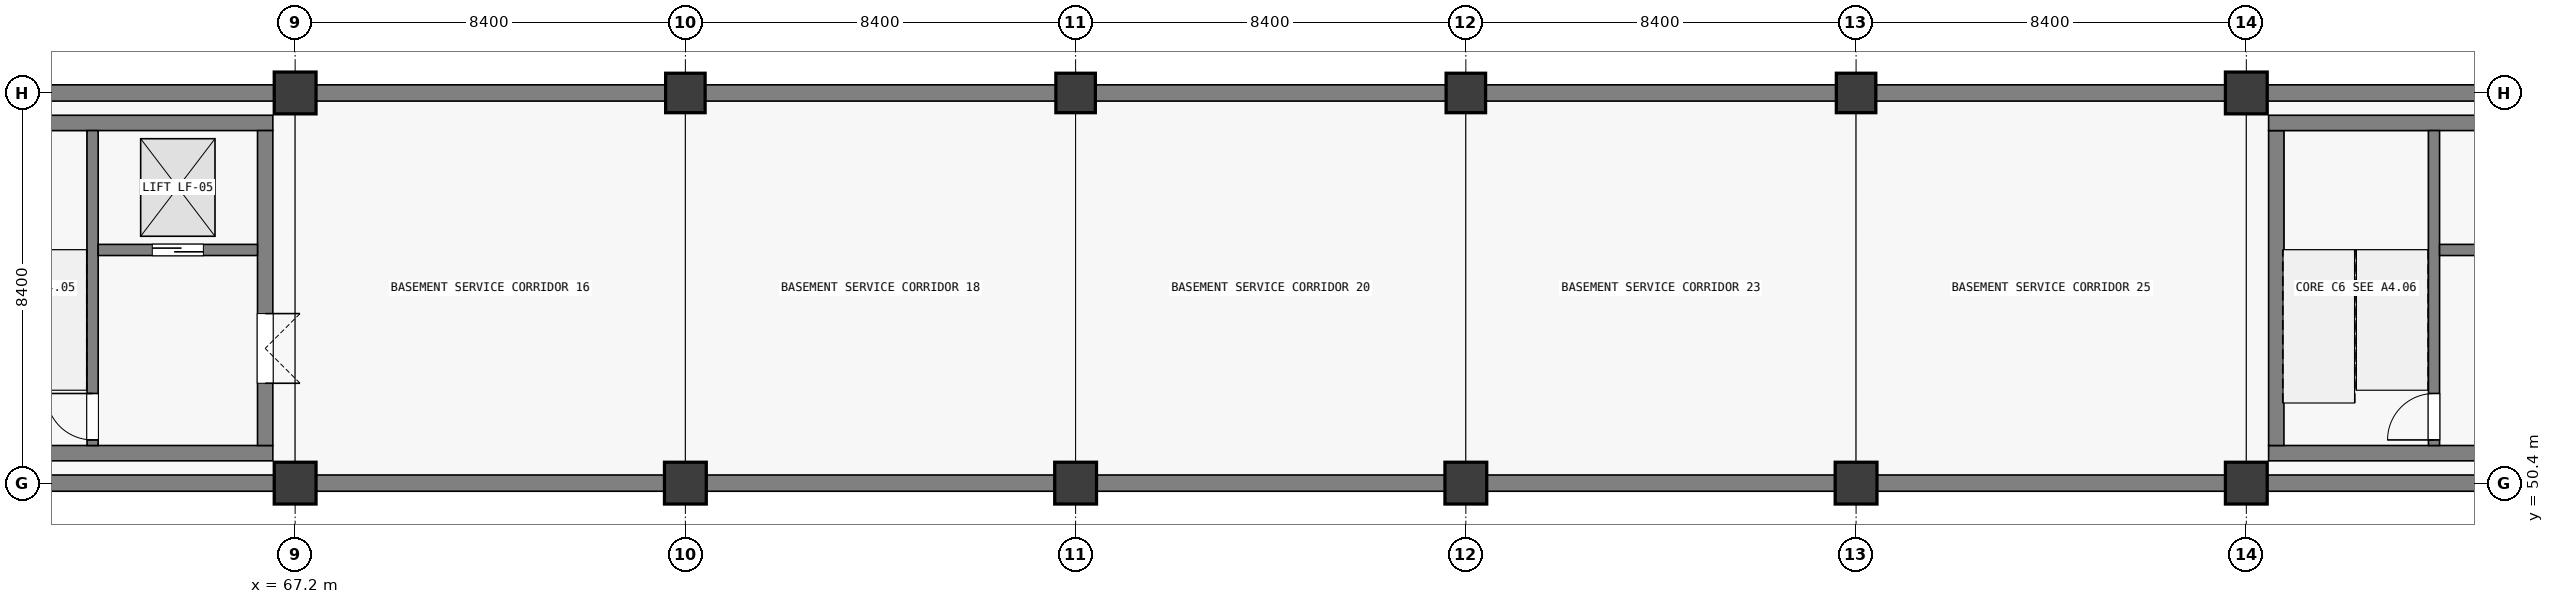
"""IFC4 building model, lengths in metres.
Left out: names, types, materials, properties, quantities, classifications, styles, units other than length and angle.
Written with IfcOpenShell. Run it as: python <this file> out.ifc"""

import sys

from ifc_helpers import new_model, si_unit, direction, frame, frame_2d, origin, origin_2d, place, context, subcontext, project, spatial, rectangle, extrude, element, fill, save


model = new_model("IFC4")
c1 = context("Model", 3, precision=1e-05, world=origin(), true_north=direction((0.0, 1.0)))
c2 = subcontext(c1, "Body", "Model", "MODEL_VIEW")
j1 = project(units=[si_unit("LENGTHUNIT", "METRE"), si_unit("PLANEANGLEUNIT", "RADIAN")], contexts=[c1])
p1 = place(None, origin())
s1 = spatial("IfcSite", under=j1, at=p1, CompositionType="ELEMENT")
p2 = place(p1, origin())
s2 = spatial("IfcBuilding", under=s1, at=p2, CompositionType="ELEMENT")
p3 = place(p2, frame((0.0, 0.0, -4.5)))
s3 = spatial("IfcBuildingStorey", under=s2, at=p3, CompositionType="ELEMENT", Elevation=-4.5)
for number, where, z_axis, x_axis in (
    (1, (67.2, 50.4, -0.35), (0.0, 0.0, 1.0), (1.0, 0.0, 0.0)),
    (2, (67.2, 58.8, -0.35), (0.0, 0.0, 1.0), (1.0, 0.0, 0.0)),
    (3, (75.6, 50.4, -0.35), (0.0, 0.0, 1.0), (1.0, 0.0, 0.0)),
):
    element("IfcColumn", number, at=place(p3, frame(where, z_axis=z_axis, x_axis=x_axis)), inside=s3, PredefinedType="COLUMN", context=c2, shape_type="SweptSolid", body=[
        extrude(rectangle(XDim=0.9, YDim=0.9, at=origin_2d()), origin(), (0.0, 0.0, 1.0), 4.85),
    ])
p4 = place(p3, frame((75.6, 58.8, -0.35), z_axis=(0.0, 0.0, 1.0), x_axis=(1.0, 0.0, 0.0)))
e4 = element("IfcColumn", 4, at=p4, inside=s3, PredefinedType="COLUMN", context=c2, shape_type="SweptSolid", body=[
    extrude(rectangle(XDim=0.85, YDim=0.85, at=origin_2d()), origin(), (0.0, 0.0, 1.0), 4.5),
])
p5 = place(p3, frame((84.0, 50.4, -0.35), z_axis=(0.0, 0.0, 1.0), x_axis=(1.0, 0.0, 0.0)))
e5 = element("IfcColumn", 5, at=p5, inside=s3, PredefinedType="COLUMN", context=c2, shape_type="SweptSolid", body=[
    extrude(rectangle(XDim=0.9, YDim=0.9, at=origin_2d()), origin(), (0.0, 0.0, 1.0), 4.85),
])
p6 = place(p3, frame((84.0, 58.8, -0.35), z_axis=(0.0, 0.0, 1.0), x_axis=(1.0, 0.0, 0.0)))
e6 = element("IfcColumn", 6, at=p6, inside=s3, PredefinedType="COLUMN", context=c2, shape_type="SweptSolid", body=[
    extrude(rectangle(XDim=0.85, YDim=0.85, at=origin_2d()), origin(), (0.0, 0.0, 1.0), 4.5),
])
p7 = place(p3, frame((92.4, 50.4, -0.35), z_axis=(0.0, 0.0, 1.0), x_axis=(1.0, 0.0, 0.0)))
e7 = element("IfcColumn", 7, at=p7, inside=s3, PredefinedType="COLUMN", context=c2, shape_type="SweptSolid", body=[
    extrude(rectangle(XDim=0.9, YDim=0.9, at=origin_2d()), origin(), (0.0, 0.0, 1.0), 4.85),
])
p8 = place(p3, frame((92.4, 58.8, -0.35), z_axis=(0.0, 0.0, 1.0), x_axis=(1.0, 0.0, 0.0)))
e8 = element("IfcColumn", 8, at=p8, inside=s3, PredefinedType="COLUMN", context=c2, shape_type="SweptSolid", body=[
    extrude(rectangle(XDim=0.85, YDim=0.85, at=origin_2d()), origin(), (0.0, 0.0, 1.0), 4.5),
])
p9 = place(p3, frame((100.8, 50.4, -0.35), z_axis=(0.0, 0.0, 1.0), x_axis=(1.0, 0.0, 0.0)))
e9 = element("IfcColumn", 9, at=p9, inside=s3, PredefinedType="COLUMN", context=c2, shape_type="SweptSolid", body=[
    extrude(rectangle(XDim=0.9, YDim=0.9, at=origin_2d()), origin(), (0.0, 0.0, 1.0), 4.85),
])
p10 = place(p3, frame((100.8, 58.8, -0.35), z_axis=(0.0, 0.0, 1.0), x_axis=(1.0, 0.0, 0.0)))
e10 = element("IfcColumn", 10, at=p10, inside=s3, PredefinedType="COLUMN", context=c2, shape_type="SweptSolid", body=[
    extrude(rectangle(XDim=0.85, YDim=0.85, at=origin_2d()), origin(), (0.0, 0.0, 1.0), 4.5),
])
for number, where, z_axis, x_axis in (
    (11, (109.2, 50.4, -0.35), (0.0, 0.0, 1.0), (1.0, 0.0, 0.0)),
    (12, (109.2, 58.8, -0.35), (0.0, 0.0, 1.0), (1.0, 0.0, 0.0)),
):
    element("IfcColumn", number, at=place(p3, frame(where, z_axis=z_axis, x_axis=x_axis)), inside=s3, PredefinedType="COLUMN", context=c2, shape_type="SweptSolid", body=[
        extrude(rectangle(XDim=0.9, YDim=0.9, at=origin_2d()), origin(), (0.0, 0.0, 1.0), 4.85),
    ])
for number, where, z_axis, x_axis in (
    (13, (66.749, 50.4, 0.0), (0.0, 0.0, 1.0), (-1.0, 0.0, 0.0)),
    (14, (59.251, 58.8, 0.0), (0.0, 0.0, 1.0), (1.0, 0.0, 0.0)),
    (15, (75.149, 50.4, 0.0), (0.0, 0.0, 1.0), (-1.0, 0.0, 0.0)),
):
    element("IfcWall", number, at=place(p3, frame(where, z_axis=z_axis, x_axis=x_axis)), inside=s3, PredefinedType="SOLIDWALL", context=c2, shape_type="SweptSolid", body=[
        extrude(rectangle(XDim=7.498, YDim=0.35, at=frame_2d((3.749, 0.0))), origin(), (0.0, 0.0, 1.0), 3.35),
    ])
p11 = place(p3, frame((67.651, 58.8, 0.0), z_axis=(0.0, 0.0, 1.0), x_axis=(1.0, 0.0, 0.0)))
e16 = element("IfcWall", 16, at=p11, inside=s3, PredefinedType="SOLIDWALL", context=c2, shape_type="SweptSolid", body=[
    extrude(rectangle(XDim=7.523, YDim=0.35, at=frame_2d((3.762, 0.0))), origin(), (0.0, 0.0, 1.0), 3.35),
])
p12 = place(p3, frame((83.549, 50.4, 0.0), z_axis=(0.0, 0.0, 1.0), x_axis=(-1.0, 0.0, 0.0)))
e17 = element("IfcWall", 17, at=p12, inside=s3, PredefinedType="SOLIDWALL", context=c2, shape_type="SweptSolid", body=[
    extrude(rectangle(XDim=7.498, YDim=0.35, at=frame_2d((3.749, 0.0))), origin(), (0.0, 0.0, 1.0), 3.35),
])
p13 = place(p3, frame((76.026, 58.8, 0.0), z_axis=(0.0, 0.0, 1.0), x_axis=(1.0, 0.0, 0.0)))
e18 = element("IfcWall", 18, at=p13, inside=s3, PredefinedType="SOLIDWALL", context=c2, shape_type="SweptSolid", body=[
    extrude(rectangle(XDim=7.548, YDim=0.35, at=frame_2d((3.774, 0.0))), origin(), (0.0, 0.0, 1.0), 3.35),
])
p14 = place(p3, frame((91.949, 50.4, 0.0), z_axis=(0.0, 0.0, 1.0), x_axis=(-1.0, 0.0, 0.0)))
e19 = element("IfcWall", 19, at=p14, inside=s3, PredefinedType="SOLIDWALL", context=c2, shape_type="SweptSolid", body=[
    extrude(rectangle(XDim=7.498, YDim=0.35, at=frame_2d((3.749, 0.0))), origin(), (0.0, 0.0, 1.0), 3.35),
])
p15 = place(p3, frame((84.426, 58.8, 0.0), z_axis=(0.0, 0.0, 1.0), x_axis=(1.0, 0.0, 0.0)))
e20 = element("IfcWall", 20, at=p15, inside=s3, PredefinedType="SOLIDWALL", context=c2, shape_type="SweptSolid", body=[
    extrude(rectangle(XDim=7.548, YDim=0.35, at=frame_2d((3.774, 0.0))), origin(), (0.0, 0.0, 1.0), 3.35),
])
p16 = place(p3, frame((100.349, 50.4, 0.0), z_axis=(0.0, 0.0, 1.0), x_axis=(-1.0, 0.0, 0.0)))
e21 = element("IfcWall", 21, at=p16, inside=s3, PredefinedType="SOLIDWALL", context=c2, shape_type="SweptSolid", body=[
    extrude(rectangle(XDim=7.498, YDim=0.35, at=frame_2d((3.749, 0.0))), origin(), (0.0, 0.0, 1.0), 3.35),
])
p17 = place(p3, frame((92.826, 58.8, 0.0), z_axis=(0.0, 0.0, 1.0), x_axis=(1.0, 0.0, 0.0)))
e22 = element("IfcWall", 22, at=p17, inside=s3, PredefinedType="SOLIDWALL", context=c2, shape_type="SweptSolid", body=[
    extrude(rectangle(XDim=7.548, YDim=0.35, at=frame_2d((3.774, 0.0))), origin(), (0.0, 0.0, 1.0), 3.35),
])
p18 = place(p3, frame((108.749, 50.4, 0.0), z_axis=(0.0, 0.0, 1.0), x_axis=(-1.0, 0.0, 0.0)))
e23 = element("IfcWall", 23, at=p18, inside=s3, PredefinedType="SOLIDWALL", context=c2, shape_type="SweptSolid", body=[
    extrude(rectangle(XDim=7.498, YDim=0.35, at=frame_2d((3.749, 0.0))), origin(), (0.0, 0.0, 1.0), 3.35),
])
p19 = place(p3, frame((101.226, 58.8, 0.0), z_axis=(0.0, 0.0, 1.0), x_axis=(1.0, 0.0, 0.0)))
e24 = element("IfcWall", 24, at=p19, inside=s3, PredefinedType="SOLIDWALL", context=c2, shape_type="SweptSolid", body=[
    extrude(rectangle(XDim=7.523, YDim=0.35, at=frame_2d((3.761, 0.0))), origin(), (0.0, 0.0, 1.0), 3.35),
])
for number, where, z_axis, x_axis in (
    (25, (117.149, 50.4, 0.0), (0.0, 0.0, 1.0), (-1.0, 0.0, 0.0)),
    (26, (109.651, 58.8, 0.0), (0.0, 0.0, 1.0), (1.0, 0.0, 0.0)),
):
    element("IfcWall", number, at=place(p3, frame(where, z_axis=z_axis, x_axis=x_axis)), inside=s3, PredefinedType="SOLIDWALL", context=c2, shape_type="SweptSolid", body=[
        extrude(rectangle(XDim=7.498, YDim=0.35, at=frame_2d((3.749, 0.0))), origin(), (0.0, 0.0, 1.0), 3.35),
    ])
for number, where, z_axis, x_axis in (
    (27, (66.72, 51.045, -0.35), (0.0, 0.0, 1.0), (-1.0, 0.0, 0.0)),
    (28, (59.28, 58.155, -0.35), (0.0, 0.0, 1.0), (1.0, 0.0, 0.0)),
):
    element("IfcWall", number, at=place(p3, frame(where, z_axis=z_axis, x_axis=x_axis)), inside=s3, PredefinedType="SHEAR", context=c2, shape_type="SweptSolid", body=[
        extrude(rectangle(XDim=7.44, YDim=0.33, at=frame_2d((3.72, 0.0))), origin(), (0.0, 0.0, 1.0), 4.85),
    ])
p20 = place(p3, frame((66.555, 57.99, -0.35), z_axis=(0.0, 0.0, 1.0), x_axis=(0.0, -1.0, 0.0)))
e29 = element("IfcWall", 29, at=p20, inside=s3, PredefinedType="SHEAR", context=c2, shape_type="SweptSolid", body=[
    extrude(rectangle(XDim=6.78, YDim=0.33, at=frame_2d((3.39, 0.0))), origin(), (0.0, 0.0, 1.0), 4.85),
])
p21 = place(p20, frame((3.94, 0.0, 0.35)))
e30 = element("IfcOpeningElement", 30, at=p21, cuts=e29, PredefinedType="OPENING", context=c2, shape_type="SweptSolid", body=[
    extrude(rectangle(XDim=1.5, YDim=2.15, at=frame_2d((0.75, 1.075))), frame((0.0, 0.165, 0.0), z_axis=(0.0, -1.0, 0.0), x_axis=(1.0, 0.0, 0.0)), (0.0, 0.0, 1.0), 0.33),
])
p22 = place(p3, frame((62.84, 51.21, -0.35), z_axis=(0.0, 0.0, 1.0), x_axis=(0.0, 1.0, 0.0)))
e31 = element("IfcWall", 31, at=p22, inside=s3, PredefinedType="SHEAR", context=c2, shape_type="SweptSolid", body=[
    extrude(rectangle(XDim=6.78, YDim=0.24, at=frame_2d((3.39, 0.0))), origin(), (0.0, 0.0, 1.0), 4.85),
])
p23 = place(p22, frame((0.12, 0.0, 0.35)))
e32 = element("IfcOpeningElement", 32, at=p23, cuts=e31, PredefinedType="OPENING", context=c2, shape_type="SweptSolid", body=[
    extrude(rectangle(XDim=1.0, YDim=2.15, at=frame_2d((0.5, 1.075))), frame((0.0, 0.12, 0.0), z_axis=(0.0, -1.0, 0.0), x_axis=(1.0, 0.0, 0.0)), (0.0, 0.0, 1.0), 0.24),
])
p24 = place(p3, frame((62.96, 55.42, -0.35), z_axis=(0.0, 0.0, 1.0), x_axis=(1.0, 0.0, 0.0)))
e33 = element("IfcWall", 33, at=p24, inside=s3, PredefinedType="SHEAR", context=c2, shape_type="SweptSolid", body=[
    extrude(rectangle(XDim=3.43, YDim=0.24, at=frame_2d((1.715, 0.0))), origin(), (0.0, 0.0, 1.0), 4.85),
])
p25 = place(p24, frame((1.165, 0.0, 0.35)))
e34 = element("IfcOpeningElement", 34, at=p25, cuts=e33, PredefinedType="OPENING", context=c2, shape_type="SweptSolid", body=[
    extrude(rectangle(XDim=1.1, YDim=2.15, at=frame_2d((0.55, 1.075))), frame((0.0, 0.12, 0.0), z_axis=(0.0, -1.0, 0.0), x_axis=(1.0, 0.0, 0.0)), (0.0, 0.0, 1.0), 0.24),
])
p26 = place(p3, frame((117.12, 51.045, -0.35), z_axis=(0.0, 0.0, 1.0), x_axis=(-1.0, 0.0, 0.0)))
e35 = element("IfcWall", 35, at=p26, inside=s3, PredefinedType="SHEAR", context=c2, shape_type="SweptSolid", body=[
    extrude(rectangle(XDim=7.44, YDim=0.33, at=frame_2d((3.72, 0.0))), origin(), (0.0, 0.0, 1.0), 4.85),
])
p27 = place(p3, frame((109.845, 51.21, -0.35), z_axis=(0.0, 0.0, 1.0), x_axis=(0.0, 1.0, 0.0)))
e36 = element("IfcWall", 36, at=p27, inside=s3, PredefinedType="SHEAR", context=c2, shape_type="SweptSolid", body=[
    extrude(rectangle(XDim=6.78, YDim=0.33, at=frame_2d((3.39, 0.0))), origin(), (0.0, 0.0, 1.0), 4.85),
])
p28 = place(p3, frame((109.68, 58.155, -0.35), z_axis=(0.0, 0.0, 1.0), x_axis=(1.0, 0.0, 0.0)))
e37 = element("IfcWall", 37, at=p28, inside=s3, PredefinedType="SHEAR", context=c2, shape_type="SweptSolid", body=[
    extrude(rectangle(XDim=7.44, YDim=0.33, at=frame_2d((3.72, 0.0))), origin(), (0.0, 0.0, 1.0), 4.85),
])
p29 = place(p3, frame((113.24, 51.21, -0.35), z_axis=(0.0, 0.0, 1.0), x_axis=(0.0, 1.0, 0.0)))
e38 = element("IfcWall", 38, at=p29, inside=s3, PredefinedType="SHEAR", context=c2, shape_type="SweptSolid", body=[
    extrude(rectangle(XDim=6.78, YDim=0.24, at=frame_2d((3.39, 0.0))), origin(), (0.0, 0.0, 1.0), 4.85),
])
p30 = place(p29, frame((0.12, 0.0, 0.35)))
e39 = element("IfcOpeningElement", 39, at=p30, cuts=e38, PredefinedType="OPENING", context=c2, shape_type="SweptSolid", body=[
    extrude(rectangle(XDim=1.0, YDim=2.15, at=frame_2d((0.5, 1.075))), frame((0.0, 0.12, 0.0), z_axis=(0.0, -1.0, 0.0), x_axis=(1.0, 0.0, 0.0)), (0.0, 0.0, 1.0), 0.24),
])
p31 = place(p3, frame((113.36, 55.42, -0.35), z_axis=(0.0, 0.0, 1.0), x_axis=(1.0, 0.0, 0.0)))
e40 = element("IfcWall", 40, at=p31, inside=s3, PredefinedType="SHEAR", context=c2, shape_type="SweptSolid", body=[
    extrude(rectangle(XDim=3.43, YDim=0.24, at=frame_2d((1.715, 0.0))), origin(), (0.0, 0.0, 1.0), 4.85),
])
p32 = place(p31, frame((1.165, 0.0, 0.35)))
e41 = element("IfcOpeningElement", 41, at=p32, cuts=e40, PredefinedType="OPENING", context=c2, shape_type="SweptSolid", body=[
    extrude(rectangle(XDim=1.1, YDim=2.15, at=frame_2d((0.55, 1.075))), frame((0.0, 0.12, 0.0), z_axis=(0.0, -1.0, 0.0), x_axis=(1.0, 0.0, 0.0)), (0.0, 0.0, 1.0), 0.24),
])
p33 = place(p23, origin())
e42 = element("IfcDoor", 42, at=p33, inside=s3, OperationType="SINGLE_SWING_RIGHT", PredefinedType="DOOR", context=c2, shape_type="SweptSolid", body=[
    extrude(rectangle(XDim=1.0, YDim=2.15, at=frame_2d((0.5, 1.075))), frame((0.0, 0.025, 0.0), z_axis=(0.0, -1.0, 0.0), x_axis=(1.0, 0.0, 0.0)), (0.0, 0.0, 1.0), 0.05),
])
fill(e32, e42)
p34 = place(p21, origin())
e43 = element("IfcDoor", 43, at=p34, inside=s3, OperationType="DOUBLE_DOOR_SINGLE_SWING", PredefinedType="DOOR", context=c2, shape_type="SweptSolid", body=[
    extrude(rectangle(XDim=1.5, YDim=2.15, at=frame_2d((0.75, 1.075))), frame((0.0, 0.025, 0.0), z_axis=(0.0, -1.0, 0.0), x_axis=(1.0, 0.0, 0.0)), (0.0, 0.0, 1.0), 0.05),
])
fill(e30, e43)
p35 = place(p25, origin())
e44 = element("IfcDoor", 44, at=p35, inside=s3, OperationType="DOUBLE_DOOR_SLIDING", PredefinedType="DOOR", context=c2, shape_type="SweptSolid", body=[
    extrude(rectangle(XDim=1.1, YDim=2.15, at=frame_2d((0.55, 1.075))), frame((0.0, 0.025, 0.0), z_axis=(0.0, -1.0, 0.0), x_axis=(1.0, 0.0, 0.0)), (0.0, 0.0, 1.0), 0.05),
])
fill(e34, e44)
p36 = place(p30, origin())
e45 = element("IfcDoor", 45, at=p36, inside=s3, OperationType="SINGLE_SWING_LEFT", PredefinedType="DOOR", context=c2, shape_type="SweptSolid", body=[
    extrude(rectangle(XDim=1.0, YDim=2.15, at=frame_2d((0.5, 1.075))), frame((0.0, 0.025, 0.0), z_axis=(0.0, -1.0, 0.0), x_axis=(1.0, 0.0, 0.0)), (0.0, 0.0, 1.0), 0.05),
])
fill(e39, e45)
save(model, sys.argv[1])
